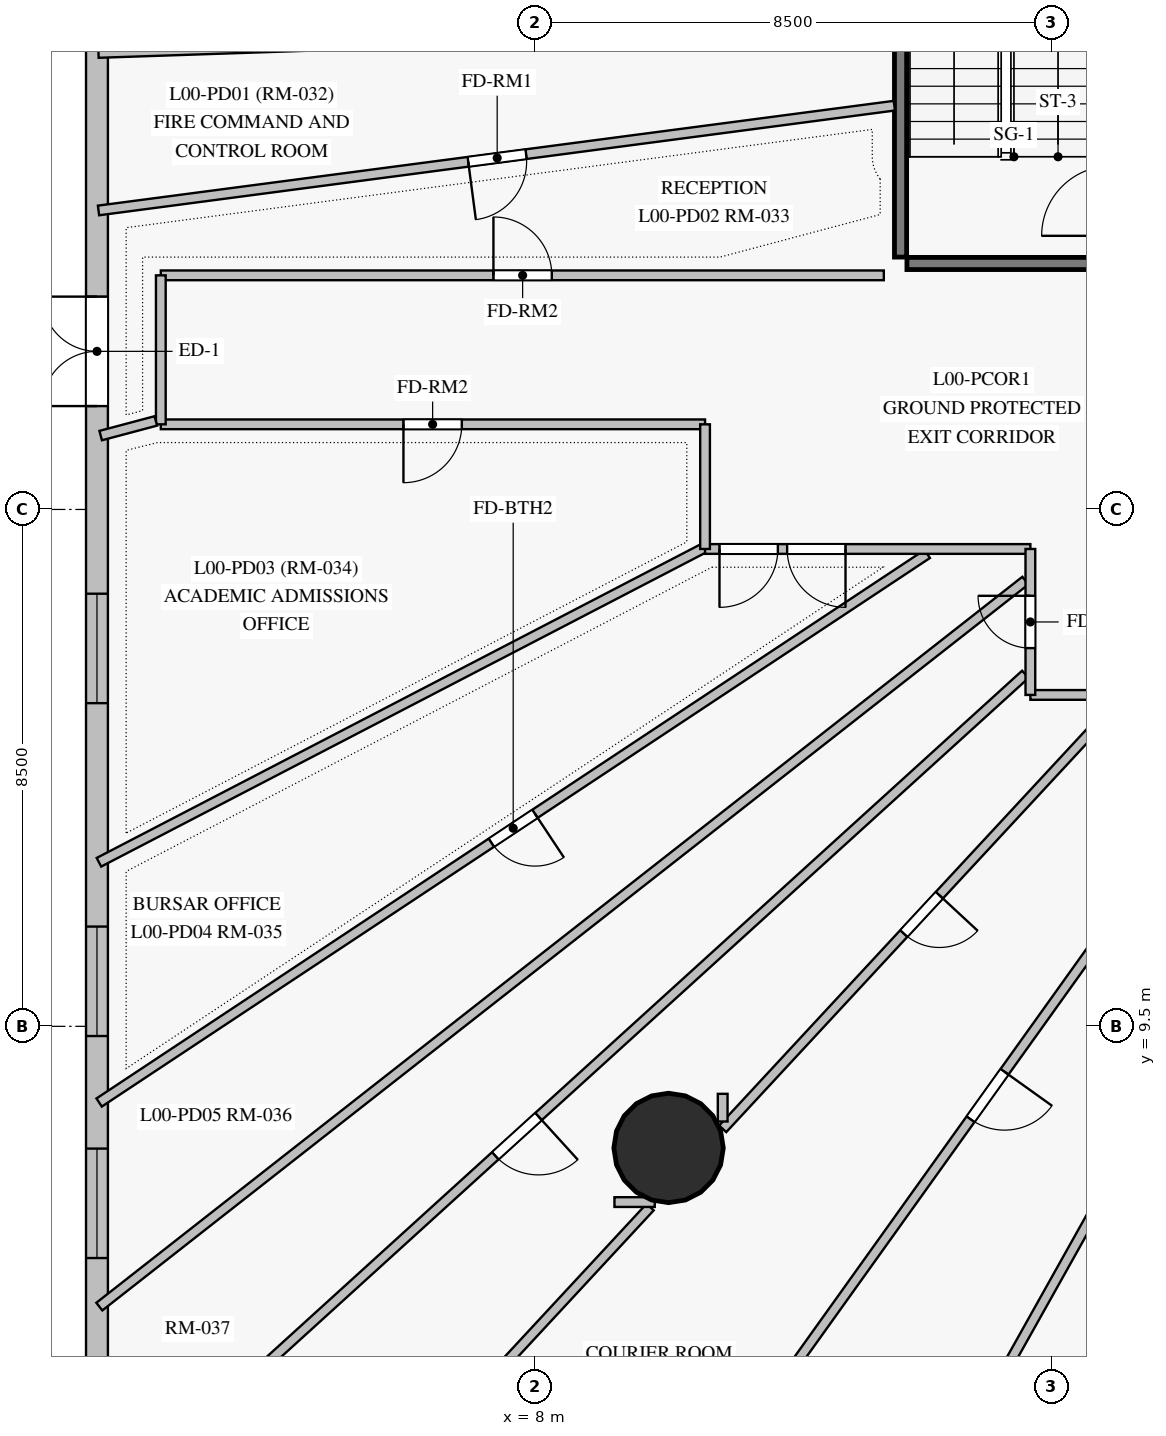
"""IFC4 building model, lengths in metres.
Left out: names, types, materials, properties, quantities, classifications, styles, units other than length and angle.
Written with IfcOpenShell. Run it as: python <this file> out.ifc"""

import sys

from ifc_helpers import new_model, si_unit, direction, frame, frame_2d, origin, origin_with_axes, origin_2d, place, context, subcontext, project, spatial, rectangle, circle, extrude, source, transform, mapped, element, fill, save


model = new_model("IFC4")
c1 = context("Model", 3, precision=1e-05, world=origin(), true_north=direction((0.0, 1.0)))
c2 = subcontext(c1, "Body", "Model", "MODEL_VIEW")
j1 = project(units=[si_unit("LENGTHUNIT", "METRE"), si_unit("PLANEANGLEUNIT", "RADIAN")], contexts=[c1])
p1 = place(None, origin())
s1 = spatial("IfcSite", under=j1, at=p1, CompositionType="ELEMENT")
p2 = place(p1, origin())
s2 = spatial("IfcBuilding", under=s1, at=p2, CompositionType="ELEMENT")
p3 = place(p2, origin())
s3 = spatial("IfcBuildingStorey", under=s2, at=p3, CompositionType="ELEMENT", Elevation=0.0)
m1 = source(origin_with_axes(), c2, "Body", "SweptSolid", [
    extrude(circle(Radius=0.9, at=origin_2d()), origin(), (0.0, 0.0, 1.0), 4.5),
])
p4 = place(p3, frame((10.2, 7.5, 0.0), z_axis=(0.0, 0.0, 1.0), x_axis=(1.0, 0.0, 0.0)))
e1 = element("IfcColumn", 1, at=p4, inside=s3, PredefinedType="COLUMN", context=c2, shape_type="MappedRepresentation", body=[
    mapped(m1, transform((0.0, 0.0, 0.0), scale=1.0)),
])
p5 = place(p3, frame((0.8, 2.5, 0.0), z_axis=(0.0, 0.0, 1.0), x_axis=(0.0, 1.0, 0.0)))
e2 = element("IfcWall", 2, at=p5, inside=s3, PredefinedType="SOLIDWALL", context=c2, shape_type="SweptSolid", body=[
    extrude(rectangle(XDim=48.0, YDim=0.36, at=frame_2d((24.0, 0.0))), origin(), (0.0, 0.0, 1.0), 4.2),
])
p6 = place(p5, frame((42.816, 0.0, 0.85)))
e3 = element("IfcOpeningElement", 3, at=p6, cuts=e2, PredefinedType="OPENING", context=c2, shape_type="SweptSolid", body=[
    extrude(rectangle(XDim=1.8, YDim=2.2, at=frame_2d((0.9, 1.1))), frame((0.0, 0.19, 0.0), z_axis=(0.0, -1.0, 0.0), x_axis=(1.0, 0.0, 0.0)), (0.0, 0.0, 1.0), 0.38),
])
p7 = place(p5, frame((38.338, 0.0, 0.85)))
e4 = element("IfcOpeningElement", 4, at=p7, cuts=e2, PredefinedType="OPENING", context=c2, shape_type="SweptSolid", body=[
    extrude(rectangle(XDim=1.8, YDim=2.2, at=frame_2d((0.9, 1.1))), frame((0.0, 0.19, 0.0), z_axis=(0.0, -1.0, 0.0), x_axis=(1.0, 0.0, 0.0)), (0.0, 0.0, 1.0), 0.38),
])
p8 = place(p5, frame((33.194, 0.0, 0.85)))
e5 = element("IfcOpeningElement", 5, at=p8, cuts=e2, PredefinedType="OPENING", context=c2, shape_type="SweptSolid", body=[
    extrude(rectangle(XDim=1.8, YDim=2.2, at=frame_2d((0.9, 1.1))), frame((0.0, 0.19, 0.0), z_axis=(0.0, -1.0, 0.0), x_axis=(1.0, 0.0, 0.0)), (0.0, 0.0, 1.0), 0.38),
])
p9 = place(p5, frame((29.492, 0.0, 0.85)))
e6 = element("IfcOpeningElement", 6, at=p9, cuts=e2, PredefinedType="OPENING", context=c2, shape_type="SweptSolid", body=[
    extrude(rectangle(XDim=1.8, YDim=2.2, at=frame_2d((0.9, 1.1))), frame((0.0, 0.19, 0.0), z_axis=(0.0, -1.0, 0.0), x_axis=(1.0, 0.0, 0.0)), (0.0, 0.0, 1.0), 0.38),
])
p10 = place(p5, frame((24.971, 0.0, 0.85)))
e7 = element("IfcOpeningElement", 7, at=p10, cuts=e2, PredefinedType="OPENING", context=c2, shape_type="SweptSolid", body=[
    extrude(rectangle(XDim=1.8, YDim=2.2, at=frame_2d((0.9, 1.1))), frame((0.0, 0.19, 0.0), z_axis=(0.0, -1.0, 0.0), x_axis=(1.0, 0.0, 0.0)), (0.0, 0.0, 1.0), 0.38),
])
p11 = place(p5, frame((12.315, 0.0, 0.85)))
e8 = element("IfcOpeningElement", 8, at=p11, cuts=e2, PredefinedType="OPENING", context=c2, shape_type="SweptSolid", body=[
    extrude(rectangle(XDim=1.8, YDim=2.2, at=frame_2d((0.9, 1.1))), frame((0.0, 0.19, 0.0), z_axis=(0.0, -1.0, 0.0), x_axis=(1.0, 0.0, 0.0)), (0.0, 0.0, 1.0), 0.38),
])
p12 = place(p5, frame((6.841, 0.0, 0.85)))
e9 = element("IfcOpeningElement", 9, at=p12, cuts=e2, PredefinedType="OPENING", context=c2, shape_type="SweptSolid", body=[
    extrude(rectangle(XDim=1.8, YDim=2.2, at=frame_2d((0.9, 1.1))), frame((0.0, 0.19, 0.0), z_axis=(0.0, -1.0, 0.0), x_axis=(1.0, 0.0, 0.0)), (0.0, 0.0, 1.0), 0.38),
])
p13 = place(p5, frame((3.189, 0.0, 0.85)))
e10 = element("IfcOpeningElement", 10, at=p13, cuts=e2, PredefinedType="OPENING", context=c2, shape_type="SweptSolid", body=[
    extrude(rectangle(XDim=1.8, YDim=2.2, at=frame_2d((0.9, 1.1))), frame((0.0, 0.19, 0.0), z_axis=(0.0, -1.0, 0.0), x_axis=(1.0, 0.0, 0.0)), (0.0, 0.0, 1.0), 0.38),
])
p14 = place(p5, frame((17.2, 0.0, 0.0)))
e11 = element("IfcOpeningElement", 11, at=p14, cuts=e2, PredefinedType="OPENING", context=c2, shape_type="SweptSolid", body=[
    extrude(rectangle(XDim=1.8, YDim=2.3, at=frame_2d((0.9, 1.15))), frame((0.0, 0.19, 0.0), z_axis=(0.0, -1.0, 0.0), x_axis=(1.0, 0.0, 0.0)), (0.0, 0.0, 1.0), 0.38),
])
p15 = place(p3, frame((14.015, 22.15, 0.0), z_axis=(0.0, 0.0, 1.0), x_axis=(0.0, 1.0, 0.0)))
e12 = element("IfcWall", 12, at=p15, inside=s3, PredefinedType="SHEAR", context=c2, shape_type="SweptSolid", body=[
    extrude(rectangle(XDim=7.35, YDim=0.2, at=frame_2d((3.675, 0.0))), origin(), (0.0, 0.0, 1.0), 4.2),
])
p16 = place(p3, frame((14.12, 22.045, 0.0), z_axis=(0.0, 0.0, 1.0), x_axis=(1.0, 0.0, 0.0)))
e13 = element("IfcWall", 13, at=p16, inside=s3, PredefinedType="SHEAR", context=c2, shape_type="SweptSolid", body=[
    extrude(rectangle(XDim=3.26, YDim=0.2, at=frame_2d((1.63, 0.0))), origin(), (0.0, 0.0, 1.0), 4.2),
])
p17 = place(p3, frame((16.068, 15.289, 0.0), z_axis=(0.0, 0.0, 1.0), x_axis=(-0.740229029454, -0.672354805109, 0.0)))
e14 = element("IfcWall", 14, at=p17, inside=s3, PredefinedType="PARTITIONING", context=c2, shape_type="SweptSolid", body=[
    extrude(rectangle(XDim=19.837, YDim=0.16, at=frame_2d((9.918, 0.0))), origin(), (0.0, 0.0, 1.0), 3.25),
])
p18 = place(p17, frame((10.816, 0.0, 0.0)))
e15 = element("IfcOpeningElement", 15, at=p18, cuts=e14, PredefinedType="OPENING", context=c2, shape_type="SweptSolid", body=[
    extrude(rectangle(XDim=0.96, YDim=2.15, at=frame_2d((0.48, 1.075))), frame((0.0, 0.09, 0.0), z_axis=(0.0, -1.0, 0.0), x_axis=(1.0, 0.0, 0.0)), (0.0, 0.0, 1.0), 0.18),
])
p19 = place(p3, frame((16.068, 16.83, 0.0), z_axis=(0.0, 0.0, 1.0), x_axis=(-0.786986378296, -0.616970372366, 0.0)))
e16 = element("IfcWall", 16, at=p19, inside=s3, PredefinedType="PARTITIONING", context=c2, shape_type="SweptSolid", body=[
    extrude(rectangle(XDim=19.351, YDim=0.16, at=frame_2d((9.676, 0.0))), origin(), (0.0, 0.0, 1.0), 4.2),
])
p20 = place(p3, frame((14.454, 17.268, 0.0), z_axis=(0.0, 0.0, 1.0), x_axis=(-0.83369067589, -0.55223170584, 0.0)))
e17 = element("IfcWall", 17, at=p20, inside=s3, PredefinedType="PARTITIONING", context=c2, shape_type="SweptSolid", body=[
    extrude(rectangle(XDim=16.335, YDim=0.16, at=frame_2d((8.167, 0.0))), origin(), (0.0, 0.0, 1.0), 4.2),
])
p21 = place(p20, frame((7.737, 0.0, 0.0)))
e18 = element("IfcOpeningElement", 18, at=p21, cuts=e17, PredefinedType="OPENING", context=c2, shape_type="SweptSolid", body=[
    extrude(rectangle(XDim=0.86, YDim=2.04, at=frame_2d((0.43, 1.02))), frame((0.0, 0.09, 0.0), z_axis=(0.0, -1.0, 0.0), x_axis=(1.0, 0.0, 0.0)), (0.0, 0.0, 1.0), 0.18),
])
p22 = place(p3, frame((20.101, 14.868, 0.0), z_axis=(0.0, 0.0, 1.0), x_axis=(-0.581991703878, -0.813194722448, 0.0)))
e19 = element("IfcWall", 19, at=p22, inside=s3, PredefinedType="PARTITIONING", context=c2, shape_type="SweptSolid", body=[
    extrude(rectangle(XDim=16.024, YDim=0.16, at=frame_2d((8.012, 0.0))), origin(), (0.0, 0.0, 1.0), 4.2),
])
p23 = place(p22, frame((7.52, 0.0, 0.0)))
e20 = element("IfcOpeningElement", 20, at=p23, cuts=e19, PredefinedType="OPENING", context=c2, shape_type="SweptSolid", body=[
    extrude(rectangle(XDim=0.96, YDim=2.15, at=frame_2d((0.48, 1.075))), frame((0.0, 0.09, 0.0), z_axis=(0.0, -1.0, 0.0), x_axis=(1.0, 0.0, 0.0)), (0.0, 0.0, 1.0), 0.18),
])
p24 = place(p3, frame((21.118, 13.45, 0.0), z_axis=(0.0, 0.0, 1.0), x_axis=(-0.488869643444, -0.872356848841, 0.0)))
e21 = element("IfcWall", 21, at=p24, inside=s3, PredefinedType="PARTITIONING", context=c2, shape_type="SweptSolid", body=[
    extrude(rectangle(XDim=13.316, YDim=0.16, at=frame_2d((6.658, 0.0))), origin(), (0.0, 0.0, 1.0), 4.2),
])
p25 = place(p3, frame((13.913, 24.64, 0.0), z_axis=(0.0, 0.0, 1.0), x_axis=(-0.991443338572, -0.130537758528, 0.0)))
e22 = element("IfcWall", 22, at=p25, inside=s3, PredefinedType="PARTITIONING", context=c2, shape_type="SweptSolid", body=[
    extrude(rectangle(XDim=13.2, YDim=0.16, at=frame_2d((6.6, 0.0))), origin(), (0.0, 0.0, 1.0), 4.2),
])
p26 = place(p25, frame((6.108, 0.0, 0.0)))
e23 = element("IfcOpeningElement", 23, at=p26, cuts=e22, PredefinedType="OPENING", context=c2, shape_type="SweptSolid", body=[
    extrude(rectangle(XDim=0.96, YDim=2.15, at=frame_2d((0.48, 1.075))), frame((0.0, 0.09, 0.0), z_axis=(0.0, -1.0, 0.0), x_axis=(1.0, 0.0, 0.0)), (0.0, 0.0, 1.0), 0.18),
])
p27 = place(p3, frame((1.85, 21.85, 0.0), z_axis=(0.0, 0.0, 1.0), x_axis=(1.0, 0.0, 0.0)))
e24 = element("IfcWall", 24, at=p27, inside=s3, PredefinedType="PARTITIONING", context=c2, shape_type="SweptSolid", body=[
    extrude(rectangle(XDim=11.89, YDim=0.16, at=frame_2d((5.945, 0.0))), origin(), (0.0, 0.0, 1.0), 4.2),
])
p28 = place(p27, frame((5.47, 0.0, 0.0)))
e25 = element("IfcOpeningElement", 25, at=p28, cuts=e24, PredefinedType="OPENING", context=c2, shape_type="SweptSolid", body=[
    extrude(rectangle(XDim=0.96, YDim=2.15, at=frame_2d((0.48, 1.075))), frame((0.0, 0.09, 0.0), z_axis=(0.0, -1.0, 0.0), x_axis=(1.0, 0.0, 0.0)), (0.0, 0.0, 1.0), 0.18),
])
p29 = place(p3, frame((10.827, 17.389, 0.0), z_axis=(0.0, 0.0, 1.0), x_axis=(-0.8874495265, -0.460904912009, 0.0)))
e26 = element("IfcWall", 26, at=p29, inside=s3, PredefinedType="PARTITIONING", context=c2, shape_type="SweptSolid", body=[
    extrude(rectangle(XDim=11.262, YDim=0.16, at=frame_2d((5.631, 0.0))), origin(), (0.0, 0.0, 1.0), 4.2),
])
p30 = place(p3, frame((17.631, 14.868, 0.0), z_axis=(0.0, 0.0, 1.0), x_axis=(-0.679969088338, -0.733240778261, 0.0)))
e27 = element("IfcWall", 27, at=p30, inside=s3, PredefinedType="PARTITIONING", context=c2, shape_type="SweptSolid", body=[
    extrude(rectangle(XDim=9.62, YDim=0.16, at=frame_2d((4.81, 0.0))), origin(), (0.0, 0.0, 1.0), 3.25),
])
p31 = place(p30, frame((4.38, 0.0, 0.0)))
e28 = element("IfcOpeningElement", 28, at=p31, cuts=e27, PredefinedType="OPENING", context=c2, shape_type="SweptSolid", body=[
    extrude(rectangle(XDim=0.86, YDim=2.04, at=frame_2d((0.43, 1.02))), frame((0.0, 0.09, 0.0), z_axis=(0.0, -1.0, 0.0), x_axis=(1.0, 0.0, 0.0)), (0.0, 0.0, 1.0), 0.18),
])
p32 = place(p3, frame((10.8, 19.4, 0.0), z_axis=(0.0, 0.0, 1.0), x_axis=(-1.0, 0.0, 0.0)))
e29 = element("IfcWall", 29, at=p32, inside=s3, PredefinedType="PARTITIONING", context=c2, shape_type="SweptSolid", body=[
    extrude(rectangle(XDim=8.95, YDim=0.16, at=frame_2d((4.475, 0.0))), origin(), (0.0, 0.0, 1.0), 4.2),
])
p33 = place(p32, frame((4.0, 0.0, 0.0)))
e30 = element("IfcOpeningElement", 30, at=p33, cuts=e29, PredefinedType="OPENING", context=c2, shape_type="SweptSolid", body=[
    extrude(rectangle(XDim=0.96, YDim=2.15, at=frame_2d((0.48, 1.075))), frame((0.0, 0.09, 0.0), z_axis=(0.0, -1.0, 0.0), x_axis=(1.0, 0.0, 0.0)), (0.0, 0.0, 1.0), 0.18),
])
p34 = place(p3, frame((0.825, 25.508, 0.0), z_axis=(0.0, 0.0, 1.0), x_axis=(0.999432873897, 0.033673885638, 0.0)))
e31 = element("IfcWall", 31, at=p34, inside=s3, PredefinedType="PARTITIONING", context=c2, shape_type="SweptSolid", body=[
    extrude(rectangle(XDim=8.49, YDim=0.16, at=frame_2d((4.245, 0.0))), origin(), (0.0, 0.0, 1.0), 4.2),
])
p35 = place(p3, frame((9.897, 6.528, 0.0), z_axis=(0.0, 0.0, 1.0), x_axis=(-0.679977657187, -0.733232831866, 0.0)))
e32 = element("IfcWall", 32, at=p35, inside=s3, PredefinedType="PARTITIONING", context=c2, shape_type="SweptSolid", body=[
    extrude(rectangle(XDim=6.391, YDim=0.16, at=frame_2d((3.195, 0.0))), origin(), (0.0, 0.0, 1.0), 4.2),
])
p36 = place(p3, frame((16.15, 17.35, 0.0), z_axis=(0.0, 0.0, 1.0), x_axis=(-1.0, 0.0, 0.0)))
e33 = element("IfcWall", 33, at=p36, inside=s3, PredefinedType="PARTITIONING", context=c2, shape_type="SweptSolid", body=[
    extrude(rectangle(XDim=5.35, YDim=0.16, at=frame_2d((2.675, 0.0))), origin(), (0.0, 0.0, 1.0), 4.2),
])
p37 = place(p36, frame((3.04, 0.0, 0.0)))
e34 = element("IfcOpeningElement", 34, at=p37, cuts=e33, PredefinedType="OPENING", context=c2, shape_type="SweptSolid", body=[
    extrude(rectangle(XDim=0.96, YDim=2.15, at=frame_2d((0.48, 1.075))), frame((0.0, 0.09, 0.0), z_axis=(0.0, -1.0, 0.0), x_axis=(1.0, 0.0, 0.0)), (0.0, 0.0, 1.0), 0.18),
])
p38 = place(p36, frame((4.153, 0.0, 0.0)))
e35 = element("IfcOpeningElement", 35, at=p38, cuts=e33, PredefinedType="OPENING", context=c2, shape_type="SweptSolid", body=[
    extrude(rectangle(XDim=0.96, YDim=2.15, at=frame_2d((0.48, 1.075))), frame((0.0, 0.09, 0.0), z_axis=(0.0, -1.0, 0.0), x_axis=(1.0, 0.0, 0.0)), (0.0, 0.0, 1.0), 0.18),
])
p39 = place(p3, frame((21.2, 14.95, 0.0), z_axis=(0.0, 0.0, 1.0), x_axis=(-1.0, 0.0, 0.0)))
e36 = element("IfcWall", 36, at=p39, inside=s3, PredefinedType="PARTITIONING", context=c2, shape_type="SweptSolid", body=[
    extrude(rectangle(XDim=5.05, YDim=0.16, at=frame_2d((2.525, 0.0))), origin(), (0.0, 0.0, 1.0), 4.2),
])
p40 = place(p39, frame((2.05, 0.0, 0.0)))
e37 = element("IfcOpeningElement", 37, at=p40, cuts=e36, PredefinedType="OPENING", context=c2, shape_type="SweptSolid", body=[
    extrude(rectangle(XDim=0.96, YDim=2.15, at=frame_2d((0.48, 1.075))), frame((0.0, 0.09, 0.0), z_axis=(0.0, -1.0, 0.0), x_axis=(1.0, 0.0, 0.0)), (0.0, 0.0, 1.0), 0.18),
])
p41 = place(p3, frame((1.85, 19.4, 0.0), z_axis=(0.0, 0.0, 1.0), x_axis=(0.0, 1.0, 0.0)))
e38 = element("IfcWall", 38, at=p41, inside=s3, PredefinedType="PARTITIONING", context=c2, shape_type="SweptSolid", body=[
    extrude(rectangle(XDim=2.45, YDim=0.16, at=frame_2d((1.225, 0.0))), origin(), (0.0, 0.0, 1.0), 4.2),
])
p42 = place(p3, frame((16.15, 14.95, 0.0), z_axis=(0.0, 0.0, 1.0), x_axis=(0.0, 1.0, 0.0)))
e39 = element("IfcWall", 39, at=p42, inside=s3, PredefinedType="PARTITIONING", context=c2, shape_type="SweptSolid", body=[
    extrude(rectangle(XDim=2.4, YDim=0.16, at=frame_2d((1.2, 0.0))), origin(), (0.0, 0.0, 1.0), 3.25),
])
p43 = place(p42, frame((0.77, 0.0, 0.0)))
e40 = element("IfcOpeningElement", 40, at=p43, cuts=e39, PredefinedType="OPENING", context=c2, shape_type="SweptSolid", body=[
    extrude(rectangle(XDim=0.86, YDim=2.04, at=frame_2d((0.43, 1.02))), frame((0.0, 0.09, 0.0), z_axis=(0.0, -1.0, 0.0), x_axis=(1.0, 0.0, 0.0)), (0.0, 0.0, 1.0), 0.18),
])
p44 = place(p3, frame((10.8, 17.35, 0.0), z_axis=(0.0, 0.0, 1.0), x_axis=(0.0, 1.0, 0.0)))
e41 = element("IfcWall", 41, at=p44, inside=s3, PredefinedType="PARTITIONING", context=c2, shape_type="SweptSolid", body=[
    extrude(rectangle(XDim=2.05, YDim=0.16, at=frame_2d((1.025, 0.0))), origin(), (0.0, 0.0, 1.0), 3.25),
])
p45 = place(p3, frame((1.768, 19.456, 0.0), z_axis=(0.0, 0.0, 1.0), x_axis=(-0.966407427341, -0.257014949721, 0.0)))
e42 = element("IfcWall", 42, at=p45, inside=s3, PredefinedType="PARTITIONING", context=c2, shape_type="SweptSolid", body=[
    extrude(rectangle(XDim=0.938, YDim=0.16, at=frame_2d((0.469, 0.0))), origin(), (0.0, 0.0, 1.0), 4.2),
])
p46 = place(p3, frame((9.31, 6.61, 0.0), z_axis=(0.0, 0.0, 1.0), x_axis=(1.0, 0.0, 0.0)))
e43 = element("IfcWall", 43, at=p46, inside=s3, PredefinedType="PARTITIONING", context=c2, shape_type="SweptSolid", body=[
    extrude(rectangle(XDim=0.663, YDim=0.16, at=frame_2d((0.332, 0.0))), origin(), (0.0, 0.0, 1.0), 4.2),
])
p47 = place(p3, frame((11.09, 7.935, 0.0), z_axis=(0.0, 0.0, 1.0), x_axis=(0.0, 1.0, 0.0)))
e44 = element("IfcWall", 44, at=p47, inside=s3, PredefinedType="PARTITIONING", context=c2, shape_type="SweptSolid", body=[
    extrude(rectangle(XDim=0.455, YDim=0.16, at=frame_2d((0.228, 0.0))), origin(), (0.0, 0.0, 1.0), 3.25),
])
m2 = source(origin_with_axes(), c2, "Body", "SweptSolid", [
    extrude(rectangle(XDim=1.8, YDim=2.2, at=frame_2d((0.9, 1.1))), frame((0.0, 0.03, 0.0), z_axis=(0.0, -1.0, 0.0), x_axis=(1.0, 0.0, 0.0)), (0.0, 0.0, 1.0), 0.06),
])
p48 = place(p11, origin())
e45 = element("IfcWindow", 45, at=p48, inside=s3, PartitioningType="SINGLE_PANEL", PredefinedType="WINDOW", context=c2, shape_type="MappedRepresentation", body=[
    mapped(m2, transform((0.0, 0.0, 0.0), scale=1.0)),
])
fill(e8, e45)
p49 = place(p12, origin())
e46 = element("IfcWindow", 46, at=p49, inside=s3, PartitioningType="SINGLE_PANEL", PredefinedType="WINDOW", context=c2, shape_type="MappedRepresentation", body=[
    mapped(m2, transform((0.0, 0.0, 0.0), scale=1.0)),
])
fill(e9, e46)
p50 = place(p13, origin())
e47 = element("IfcWindow", 47, at=p50, inside=s3, PartitioningType="SINGLE_PANEL", PredefinedType="WINDOW", context=c2, shape_type="MappedRepresentation", body=[
    mapped(m2, transform((0.0, 0.0, 0.0), scale=1.0)),
])
fill(e10, e47)
m3 = source(origin_with_axes(), c2, "Body", "SweptSolid", [
    extrude(rectangle(XDim=1.8, YDim=2.3, at=frame_2d((0.9, 1.15))), frame((0.0, 0.025, 0.0), z_axis=(0.0, -1.0, 0.0), x_axis=(1.0, 0.0, 0.0)), (0.0, 0.0, 1.0), 0.05),
])
p51 = place(p14, origin())
e48 = element("IfcDoor", 48, at=p51, inside=s3, OperationType="DOUBLE_DOOR_SINGLE_SWING", PredefinedType="DOOR", context=c2, shape_type="MappedRepresentation", body=[
    mapped(m3, transform((0.0, 0.0, 0.0), scale=1.0)),
])
fill(e11, e48)
m4 = source(origin_with_axes(), c2, "Body", "SweptSolid", [
    extrude(rectangle(XDim=0.96, YDim=2.15, at=frame_2d((0.48, 1.075))), frame((0.0, 0.025, 0.0), z_axis=(0.0, -1.0, 0.0), x_axis=(1.0, 0.0, 0.0)), (0.0, 0.0, 1.0), 0.05),
])
p52 = place(p26, origin())
e49 = element("IfcDoor", 49, at=p52, inside=s3, OperationType="SINGLE_SWING_RIGHT", PredefinedType="DOOR", context=c2, shape_type="MappedRepresentation", body=[
    mapped(m4, transform((0.0, 0.0, 0.0), scale=1.0)),
])
fill(e23, e49)
p53 = place(p28, origin())
e50 = element("IfcDoor", 50, at=p53, inside=s3, OperationType="SINGLE_SWING_LEFT", PredefinedType="DOOR", context=c2, shape_type="MappedRepresentation", body=[
    mapped(m4, transform((0.0, 0.0, 0.0), scale=1.0)),
])
fill(e25, e50)
p54 = place(p33, origin())
e51 = element("IfcDoor", 51, at=p54, inside=s3, OperationType="SINGLE_SWING_RIGHT", PredefinedType="DOOR", context=c2, shape_type="MappedRepresentation", body=[
    mapped(m4, transform((0.0, 0.0, 0.0), scale=1.0)),
])
fill(e30, e51)
p55 = place(p37, origin())
e52 = element("IfcDoor", 52, at=p55, inside=s3, OperationType="SINGLE_SWING_LEFT", PredefinedType="DOOR", context=c2, shape_type="MappedRepresentation", body=[
    mapped(m4, transform((0.0, 0.0, 0.0), scale=1.0)),
])
fill(e34, e52)
p56 = place(p38, origin())
e53 = element("IfcDoor", 53, at=p56, inside=s3, OperationType="SINGLE_SWING_RIGHT", PredefinedType="DOOR", context=c2, shape_type="MappedRepresentation", body=[
    mapped(m4, transform((0.0, 0.0, 0.0), scale=1.0)),
])
fill(e35, e53)
p57 = place(p18, origin())
e54 = element("IfcDoor", 54, at=p57, inside=s3, OperationType="SINGLE_SWING_LEFT", PredefinedType="DOOR", context=c2, shape_type="MappedRepresentation", body=[
    mapped(m4, transform((0.0, 0.0, 0.0), scale=1.0)),
])
fill(e15, e54)
p58 = place(p23, origin())
e55 = element("IfcDoor", 55, at=p58, inside=s3, OperationType="SINGLE_SWING_LEFT", PredefinedType="DOOR", context=c2, shape_type="MappedRepresentation", body=[
    mapped(m4, transform((0.0, 0.0, 0.0), scale=1.0)),
])
fill(e20, e55)
m5 = source(origin_with_axes(), c2, "Body", "SweptSolid", [
    extrude(rectangle(XDim=0.86, YDim=2.04, at=frame_2d((0.43, 1.02))), frame((0.0, 0.025, 0.0), z_axis=(0.0, -1.0, 0.0), x_axis=(1.0, 0.0, 0.0)), (0.0, 0.0, 1.0), 0.05),
])
p59 = place(p21, origin())
e56 = element("IfcDoor", 56, at=p59, inside=s3, OperationType="SINGLE_SWING_LEFT", PredefinedType="DOOR", context=c2, shape_type="MappedRepresentation", body=[
    mapped(m5, transform((0.0, 0.0, 0.0), scale=1.0)),
])
fill(e18, e56)
p60 = place(p43, origin())
e57 = element("IfcDoor", 57, at=p60, inside=s3, OperationType="SINGLE_SWING_RIGHT", PredefinedType="DOOR", context=c2, shape_type="MappedRepresentation", body=[
    mapped(m5, transform((0.0, 0.0, 0.0), scale=1.0)),
])
fill(e40, e57)
p61 = place(p31, origin())
e58 = element("IfcDoor", 58, at=p61, inside=s3, OperationType="SINGLE_SWING_LEFT", PredefinedType="DOOR", context=c2, shape_type="MappedRepresentation", body=[
    mapped(m5, transform((0.0, 0.0, 0.0), scale=1.0)),
])
fill(e28, e58)
save(model, sys.argv[1])
